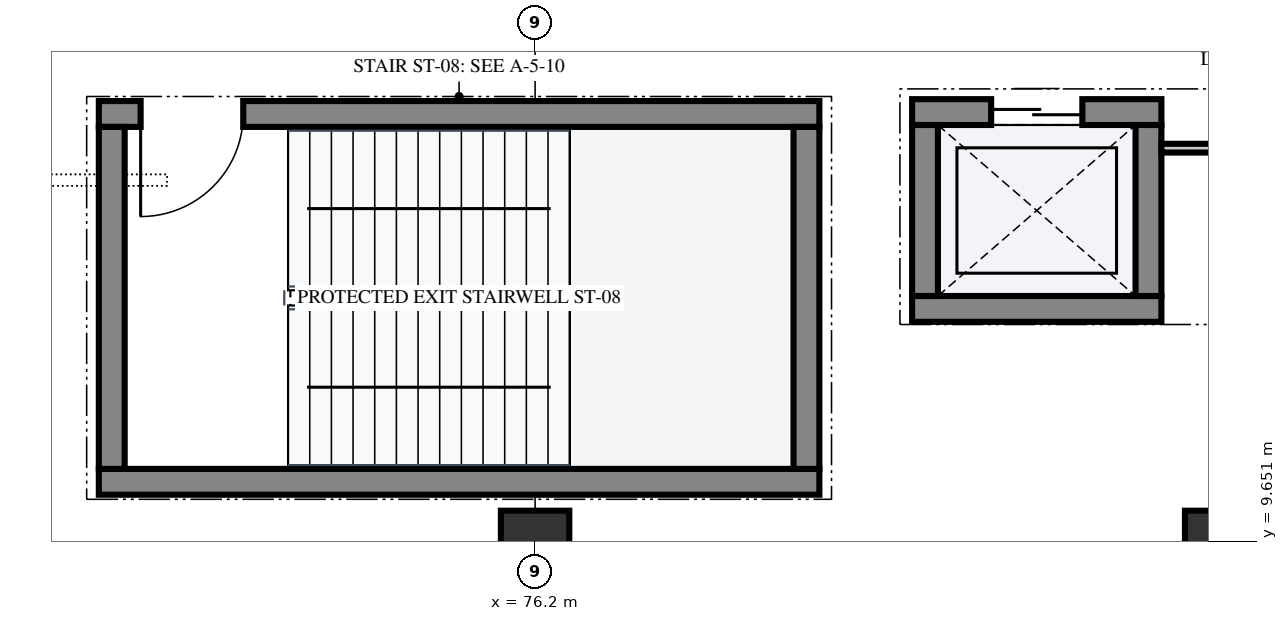
"""IFC4 building model, lengths in metres.
Left out: names, types, materials, properties, quantities, classifications, styles, units other than length and angle.
Written with IfcOpenShell. Run it as: python <this file> out.ifc"""

import sys

from ifc_helpers import new_model, si_unit, direction, frame, frame_2d, origin, origin_2d, place, context, subcontext, project, spatial, rectangle, extrude, element, fill, save


model = new_model("IFC4")
c1 = context("Model", 3, precision=1e-05, world=origin(), true_north=direction((0.0, 1.0)))
c2 = subcontext(c1, "Body", "Model", "MODEL_VIEW")
j1 = project(units=[si_unit("LENGTHUNIT", "METRE"), si_unit("PLANEANGLEUNIT", "RADIAN")], contexts=[c1])
p1 = place(None, origin())
s1 = spatial("IfcSite", under=j1, at=p1, CompositionType="ELEMENT")
p2 = place(p1, origin())
s2 = spatial("IfcBuilding", under=s1, at=p2, CompositionType="ELEMENT")
p3 = place(p2, frame((0.0, 0.0, 10.2)))
s3 = spatial("IfcBuildingStorey", under=s2, at=p3, CompositionType="ELEMENT", Elevation=10.2)
for number, where, z_axis, x_axis in (
    (1, (85.2, 9.6, 0.0), (0.0, 0.0, 1.0), (1.0, 0.0, 0.0)),
    (2, (76.2, 9.6, 0.0), (0.0, 0.0, 1.0), (1.0, 0.0, 0.0)),
):
    element("IfcColumn", number, at=place(p3, frame(where, z_axis=z_axis, x_axis=x_axis)), inside=s3, PredefinedType="COLUMN", context=c2, shape_type="SweptSolid", body=[
        extrude(rectangle(XDim=0.9, YDim=0.9, at=origin_2d()), origin(), (0.0, 0.0, 1.0), 4.8),
    ])
p4 = place(p3, frame((70.46, 10.43, 0.0), z_axis=(0.0, 0.0, 1.0), x_axis=(1.0, 0.0, 0.0)))
e3 = element("IfcWall", 3, at=p4, inside=s3, PredefinedType="SHEAR", context=c2, shape_type="SweptSolid", body=[
    extrude(rectangle(XDim=9.48, YDim=0.34, at=frame_2d((4.74, 0.0))), origin(), (0.0, 0.0, 1.0), 4.515),
])
p5 = place(p3, frame((70.46, 15.27, 0.0), z_axis=(0.0, 0.0, 1.0), x_axis=(1.0, 0.0, 0.0)))
e4 = element("IfcWall", 4, at=p5, inside=s3, PredefinedType="SHEAR", context=c2, shape_type="SweptSolid", body=[
    extrude(rectangle(XDim=9.48, YDim=0.34, at=frame_2d((4.74, 0.0))), origin(), (0.0, 0.0, 1.0), 4.515),
])
p6 = place(p5, frame((0.55, 0.0, 0.0)))
e5 = element("IfcOpeningElement", 5, at=p6, cuts=e4, PredefinedType="OPENING", context=c2, shape_type="SweptSolid", body=[
    extrude(rectangle(XDim=1.35, YDim=2.2, at=frame_2d((0.675, 1.1))), frame((0.0, 0.182, 0.0), z_axis=(0.0, -1.0, 0.0), x_axis=(1.0, 0.0, 0.0)), (0.0, 0.0, 1.0), 0.364),
])
for number, where, z_axis, x_axis in (
    (6, (79.77, 10.6, 0.0), (0.0, 0.0, 1.0), (0.0, 1.0, 0.0)),
    (7, (70.63, 10.6, 0.0), (0.0, 0.0, 1.0), (0.0, 1.0, 0.0)),
):
    element("IfcWall", number, at=place(p3, frame(where, z_axis=z_axis, x_axis=x_axis)), inside=s3, PredefinedType="SHEAR", context=c2, shape_type="SweptSolid", body=[
        extrude(rectangle(XDim=4.5, YDim=0.34, at=frame_2d((2.25, 0.0))), origin(), (0.0, 0.0, 1.0), 4.515),
    ])
p7 = place(p3, frame((81.16, 12.705, 0.0), z_axis=(0.0, 0.0, 1.0), x_axis=(1.0, 0.0, 0.0)))
e8 = element("IfcWall", 8, at=p7, inside=s3, PredefinedType="SHEAR", context=c2, shape_type="SweptSolid", body=[
    extrude(rectangle(XDim=3.28, YDim=0.34, at=frame_2d((1.64, 0.0))), origin(), (0.0, 0.0, 1.0), 4.515),
])
p8 = place(p3, frame((81.16, 15.295, 0.0), z_axis=(0.0, 0.0, 1.0), x_axis=(1.0, 0.0, 0.0)))
e9 = element("IfcWall", 9, at=p8, inside=s3, PredefinedType="SHEAR", context=c2, shape_type="SweptSolid", body=[
    extrude(rectangle(XDim=3.28, YDim=0.34, at=frame_2d((1.64, 0.0))), origin(), (0.0, 0.0, 1.0), 4.515),
])
p9 = place(p8, frame((1.04, 0.0, 0.0)))
e10 = element("IfcOpeningElement", 10, at=p9, cuts=e9, PredefinedType="OPENING", context=c2, shape_type="SweptSolid", body=[
    extrude(rectangle(XDim=1.2, YDim=2.2, at=frame_2d((0.6, 1.1))), frame((0.0, 0.182, 0.0), z_axis=(0.0, -1.0, 0.0), x_axis=(1.0, 0.0, 0.0)), (0.0, 0.0, 1.0), 0.364),
])
for number, where, z_axis, x_axis in (
    (11, (81.33, 12.875, 0.0), (0.0, 0.0, 1.0), (0.0, 1.0, 0.0)),
    (12, (84.27, 12.875, 0.0), (0.0, 0.0, 1.0), (0.0, 1.0, 0.0)),
):
    element("IfcWall", number, at=place(p3, frame(where, z_axis=z_axis, x_axis=x_axis)), inside=s3, PredefinedType="SHEAR", context=c2, shape_type="SweptSolid", body=[
        extrude(rectangle(XDim=2.25, YDim=0.34, at=frame_2d((1.125, 0.0))), origin(), (0.0, 0.0, 1.0), 4.515),
    ])
p10 = place(p3, frame((84.44, 14.82, 0.0), z_axis=(0.0, 0.0, 1.0), x_axis=(1.0, 0.0, 0.0)))
e13 = element("IfcWall", 13, at=p10, inside=s3, PredefinedType="PARTITIONING", context=c2, shape_type="SweptSolid", body=[
    extrude(rectangle(XDim=4.12, YDim=0.115, at=frame_2d((2.06, 0.0))), origin(), (0.0, 0.0, 1.0), 3.455),
])
p11 = place(p6, frame((1.35, 0.0, 0.0), z_axis=(0.0, 0.0, 1.0), x_axis=(-1.0, 0.0, 0.0)))
e14 = element("IfcDoor", 14, at=p11, inside=s3, OperationType="SINGLE_SWING_RIGHT", PredefinedType="DOOR", context=c2, shape_type="SweptSolid", body=[
    extrude(rectangle(XDim=1.35, YDim=2.2, at=frame_2d((0.675, 1.1))), frame((0.0, 0.025, 0.0), z_axis=(0.0, -1.0, 0.0), x_axis=(1.0, 0.0, 0.0)), (0.0, 0.0, 1.0), 0.05),
])
fill(e5, e14)
p12 = place(p9, origin())
e15 = element("IfcDoor", 15, at=p12, inside=s3, OperationType="DOUBLE_DOOR_SLIDING", PredefinedType="DOOR", context=c2, shape_type="SweptSolid", body=[
    extrude(rectangle(XDim=1.2, YDim=2.2, at=frame_2d((0.6, 1.1))), frame((0.0, 0.025, 0.0), z_axis=(0.0, -1.0, 0.0), x_axis=(1.0, 0.0, 0.0)), (0.0, 0.0, 1.0), 0.05),
])
fill(e10, e15)
save(model, sys.argv[1])
